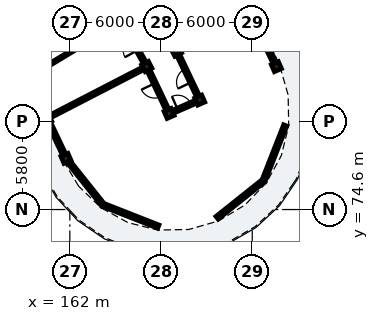
"""IFC4 building model, lengths in metres.
Left out: names, types, materials, properties, quantities, classifications, styles, units other than length and angle.
Written with IfcOpenShell. Run it as: python <this file> out.ifc"""

import sys

from ifc_helpers import new_model, si_unit, direction, frame, frame_2d, origin, origin_2d, place, context, subcontext, project, spatial, rectangle, extrude, element, fill, save


model = new_model("IFC4")
c1 = context("Model", 3, precision=1e-05, world=origin(), true_north=direction((0.0, 1.0)))
c2 = subcontext(c1, "Body", "Model", "MODEL_VIEW")
j1 = project(units=[si_unit("LENGTHUNIT", "METRE"), si_unit("PLANEANGLEUNIT", "RADIAN")], contexts=[c1])
p1 = place(None, origin())
s1 = spatial("IfcSite", under=j1, at=p1, CompositionType="ELEMENT")
p2 = place(p1, origin())
s2 = spatial("IfcBuilding", under=s1, at=p2, CompositionType="ELEMENT")
p3 = place(p2, frame((0.0, 0.0, 35.72)))
s3 = spatial("IfcBuildingStorey", under=s2, at=p3, CompositionType="ELEMENT", Elevation=35.72)
for number, where, z_axis, x_axis in (
    (1, (161.746, 77.964, 0.0), (0.0, 0.0, 1.0), (0.917, 0.4, 0.0)),
    (2, (168.53, 80.921, 0.0), (0.0, 0.0, 1.0), (0.917, 0.4, 0.0)),
    (3, (170.546, 81.801, 0.0), (0.0, 0.0, 1.0), (0.917, 0.4, 0.0)),
    (4, (175.588, 83.999, 0.0), (0.0, 0.0, 1.0), (0.917, 0.4, 0.0)),
    (5, (167.061, 84.008, 0.0), (0.0, 0.0, 1.0), (0.888, 0.459, 0.0)),
    (6, (169.015, 85.018, 0.0), (0.0, 0.0, 1.0), (0.888, 0.459, 0.0)),
):
    element("IfcColumn", number, at=place(p3, frame(where, z_axis=z_axis, x_axis=x_axis)), inside=s3, PredefinedType="COLUMN", context=c2, shape_type="SweptSolid", body=[
        extrude(rectangle(XDim=0.5, YDim=0.5, at=origin_2d()), origin(), (0.0, 0.0, 1.0), 3.115),
    ])
p4 = place(p3, frame((175.493, 84.197, 0.0), z_axis=(0.0, 0.0, 1.0), x_axis=(-0.429641817045, 0.902999395928, 0.0)))
e7 = element("IfcWall", 7, at=p4, inside=s3, PredefinedType="SOLIDWALL", context=c2, shape_type="SweptSolid", body=[
    extrude(rectangle(XDim=3.541, YDim=0.22, at=frame_2d((1.771, 0.0))), origin(), (0.0, 0.0, 1.0), 2.355),
])
p5 = place(p4, frame((1.17, 0.0, 0.55)))
e8 = element("IfcOpeningElement", 8, at=p5, cuts=e7, PredefinedType="OPENING", context=c2, shape_type="SweptSolid", body=[
    extrude(rectangle(XDim=1.2, YDim=1.51, at=frame_2d((0.6, 0.755))), frame((0.0, 0.12, 0.0), z_axis=(0.0, -1.0, 0.0), x_axis=(1.0, 0.0, 0.0)), (0.0, 0.0, 1.0), 0.24),
])
p6 = place(p3, frame((161.652, 78.163, 0.0), z_axis=(0.0, 0.0, 1.0), x_axis=(-0.429631962494, 0.903004084599, 0.0)))
e9 = element("IfcWall", 9, at=p6, inside=s3, PredefinedType="SOLIDWALL", context=c2, shape_type="SweptSolid", body=[
    extrude(rectangle(XDim=2.545, YDim=0.22, at=frame_2d((1.272, 0.0))), origin(), (0.0, 0.0, 1.0), 2.355),
])
p7 = place(p6, frame((0.533, 0.0, 0.55)))
e10 = element("IfcOpeningElement", 10, at=p7, cuts=e9, PredefinedType="OPENING", context=c2, shape_type="SweptSolid", body=[
    extrude(rectangle(XDim=1.48, YDim=1.46, at=frame_2d((0.74, 0.73))), frame((0.0, 0.12, 0.0), z_axis=(0.0, -1.0, 0.0), x_axis=(1.0, 0.0, 0.0)), (0.0, 0.0, 1.0), 0.24),
])
p8 = place(p3, frame((176.169, 80.134, 0.0), z_axis=(0.0, 0.0, 1.0), x_axis=(-0.365567330517, -0.930784898276, 0.0)))
e11 = element("IfcWall", 11, at=p8, inside=s3, PredefinedType="SOLIDWALL", context=c2, shape_type="SweptSolid", body=[
    extrude(rectangle(XDim=3.908, YDim=0.22, at=frame_2d((1.954, 0.0))), origin(), (0.0, 0.0, 1.0), 2.355),
])
p9 = place(p3, frame((174.74, 76.496, 0.0), z_axis=(0.0, 0.0, 1.0), x_axis=(-0.782007217765, -0.623269373034, 0.0)))
e12 = element("IfcWall", 12, at=p9, inside=s3, PredefinedType="SOLIDWALL", context=c2, shape_type="SweptSolid", body=[
    extrude(rectangle(XDim=3.908, YDim=0.22, at=frame_2d((1.954, 0.0))), origin(), (0.0, 0.0, 1.0), 2.355),
])
p10 = place(p9, frame((1.029, 0.0, 0.4)))
e13 = element("IfcOpeningElement", 13, at=p10, cuts=e12, PredefinedType="OPENING", context=c2, shape_type="SweptSolid", body=[
    extrude(rectangle(XDim=1.85, YDim=1.72, at=frame_2d((0.925, 0.86))), frame((0.0, 0.12, 0.0), z_axis=(0.0, -1.0, 0.0), x_axis=(1.0, 0.0, 0.0)), (0.0, 0.0, 1.0), 0.24),
])
p11 = place(p3, frame((167.82, 73.479, 0.0), z_axis=(0.0, 0.0, 1.0), x_axis=(-0.930784898276, 0.365567330517, 0.0)))
e14 = element("IfcWall", 14, at=p11, inside=s3, PredefinedType="SOLIDWALL", context=c2, shape_type="SweptSolid", body=[
    extrude(rectangle(XDim=3.908, YDim=0.22, at=frame_2d((1.954, 0.0))), origin(), (0.0, 0.0, 1.0), 2.355),
])
p12 = place(p3, frame((164.182, 74.908, 0.0), z_axis=(0.0, 0.0, 1.0), x_axis=(-0.623269373034, 0.782007217765, 0.0)))
e15 = element("IfcWall", 15, at=p12, inside=s3, PredefinedType="SOLIDWALL", context=c2, shape_type="SweptSolid", body=[
    extrude(rectangle(XDim=3.908, YDim=0.22, at=frame_2d((1.954, 0.0))), origin(), (0.0, 0.0, 1.0), 2.355),
])
p13 = place(p12, frame((1.029, 0.0, 0.4)))
e16 = element("IfcOpeningElement", 16, at=p13, cuts=e15, PredefinedType="OPENING", context=c2, shape_type="SweptSolid", body=[
    extrude(rectangle(XDim=1.85, YDim=1.72, at=frame_2d((0.925, 0.86))), frame((0.0, 0.12, 0.0), z_axis=(0.0, -1.0, 0.0), x_axis=(1.0, 0.0, 0.0)), (0.0, 0.0, 1.0), 0.24),
])
p14 = place(p3, frame((170.396, 82.116, 0.0), z_axis=(0.0, 0.0, 1.0), x_axis=(-0.429595933416, 0.90302122566, 0.0)))
e17 = element("IfcWall", 17, at=p14, inside=s3, PredefinedType="PARTITIONING", context=c2, shape_type="SweptSolid", body=[
    extrude(rectangle(XDim=2.863, YDim=0.205, at=frame_2d((1.432, 0.0))), origin(), (0.0, 0.0, 1.0), 2.37),
])
p15 = place(p14, frame((0.947, 0.0, 0.0)))
e18 = element("IfcOpeningElement", 18, at=p15, cuts=e17, PredefinedType="OPENING", context=c2, shape_type="SweptSolid", body=[
    extrude(rectangle(XDim=0.97, YDim=2.15, at=frame_2d((0.485, 1.075))), frame((0.0, 0.113, 0.0), z_axis=(0.0, -1.0, 0.0), x_axis=(1.0, 0.0, 0.0)), (0.0, 0.0, 1.0), 0.225),
])
p16 = place(p3, frame((168.379, 81.237, 0.0), z_axis=(0.0, 0.0, 1.0), x_axis=(-0.429630211913, 0.90300491749, 0.0)))
e19 = element("IfcWall", 19, at=p16, inside=s3, PredefinedType="PARTITIONING", context=c2, shape_type="SweptSolid", body=[
    extrude(rectangle(XDim=2.718, YDim=0.205, at=frame_2d((1.359, 0.0))), origin(), (0.0, 0.0, 1.0), 2.37),
])
p17 = place(p16, frame((0.874, 0.0, 0.0)))
e20 = element("IfcOpeningElement", 20, at=p17, cuts=e19, PredefinedType="OPENING", context=c2, shape_type="SweptSolid", body=[
    extrude(rectangle(XDim=0.97, YDim=2.15, at=frame_2d((0.485, 1.075))), frame((0.0, 0.113, 0.0), z_axis=(0.0, -1.0, 0.0), x_axis=(1.0, 0.0, 0.0)), (0.0, 0.0, 1.0), 0.225),
])
p18 = place(p3, frame((160.843, 80.794, 0.0), z_axis=(0.0, 0.0, 1.0), x_axis=(0.888346696024, 0.459173330741, 0.0)))
e21 = element("IfcWall", 21, at=p18, inside=s3, PredefinedType="PARTITIONING", context=c2, shape_type="SweptSolid", body=[
    extrude(rectangle(XDim=6.6, YDim=0.185, at=frame_2d((3.3, 0.0))), origin(), (0.0, 0.0, 1.0), 2.37),
])
p19 = place(p3, frame((166.89, 84.313, 0.0), z_axis=(0.0, 0.0, 1.0), x_axis=(-0.48819576874, 0.872734147025, 0.0)))
e22 = element("IfcWall", 22, at=p19, inside=s3, PredefinedType="PARTITIONING", context=c2, shape_type="SweptSolid", body=[
    extrude(rectangle(XDim=2.718, YDim=0.205, at=frame_2d((1.359, 0.0))), origin(), (0.0, 0.0, 1.0), 2.37),
])
p20 = place(p19, frame((0.884, 0.0, 0.0)))
e23 = element("IfcOpeningElement", 23, at=p20, cuts=e22, PredefinedType="OPENING", context=c2, shape_type="SweptSolid", body=[
    extrude(rectangle(XDim=0.95, YDim=2.13, at=frame_2d((0.475, 1.065))), frame((0.0, 0.113, 0.0), z_axis=(0.0, -1.0, 0.0), x_axis=(1.0, 0.0, 0.0)), (0.0, 0.0, 1.0), 0.225),
])
p21 = place(p3, frame((159.399, 83.374, 0.0), z_axis=(0.0, 0.0, 1.0), x_axis=(0.85616819337, 0.516697227263, 0.0)))
e24 = element("IfcWall", 24, at=p21, inside=s3, PredefinedType="PARTITIONING", context=c2, shape_type="SweptSolid", body=[
    extrude(rectangle(XDim=6.6, YDim=0.125, at=frame_2d((3.3, 0.0))), origin(), (0.0, 0.0, 1.0), 2.37),
])
p22 = place(p21, frame((2.865, 0.0, 0.0)))
e25 = element("IfcOpeningElement", 25, at=p22, cuts=e24, PredefinedType="OPENING", context=c2, shape_type="SweptSolid", body=[
    extrude(rectangle(XDim=0.87, YDim=2.08, at=frame_2d((0.435, 1.04))), frame((0.0, 0.073, 0.0), z_axis=(0.0, -1.0, 0.0), x_axis=(1.0, 0.0, 0.0)), (0.0, 0.0, 1.0), 0.145),
])
p23 = place(p3, frame((168.575, 80.941, 0.0), z_axis=(0.0, 0.0, 1.0), x_axis=(0.916636986934, 0.399720695216, 0.0)))
e26 = element("IfcWall", 26, at=p23, inside=s3, PredefinedType="PARTITIONING", context=c2, shape_type="SweptSolid", body=[
    extrude(rectangle(XDim=2.1, YDim=0.205, at=frame_2d((1.05, 0.0))), origin(), (0.0, 0.0, 1.0), 2.37),
])
p24 = place(p23, frame((0.57, 0.0, 0.0)))
e27 = element("IfcOpeningElement", 27, at=p24, cuts=e26, PredefinedType="OPENING", context=c2, shape_type="SweptSolid", body=[
    extrude(rectangle(XDim=0.95, YDim=2.13, at=frame_2d((0.475, 1.065))), frame((0.0, 0.113, 0.0), z_axis=(0.0, -1.0, 0.0), x_axis=(1.0, 0.0, 0.0)), (0.0, 0.0, 1.0), 0.225),
])
p25 = place(p7, origin())
e28 = element("IfcWindow", 28, at=p25, inside=s3, PartitioningType="SINGLE_PANEL", PredefinedType="WINDOW", context=c2, shape_type="SweptSolid", body=[
    extrude(rectangle(XDim=1.48, YDim=1.46, at=frame_2d((0.74, 0.73))), frame((0.0, 0.03, 0.0), z_axis=(0.0, -1.0, 0.0), x_axis=(1.0, 0.0, 0.0)), (0.0, 0.0, 1.0), 0.06),
])
fill(e10, e28)
p26 = place(p10, origin())
e29 = element("IfcWindow", 29, at=p26, inside=s3, PartitioningType="SINGLE_PANEL", PredefinedType="WINDOW", context=c2, shape_type="SweptSolid", body=[
    extrude(rectangle(XDim=1.85, YDim=1.72, at=frame_2d((0.925, 0.86))), frame((0.0, 0.03, 0.0), z_axis=(0.0, -1.0, 0.0), x_axis=(1.0, 0.0, 0.0)), (0.0, 0.0, 1.0), 0.06),
])
fill(e13, e29)
p27 = place(p13, origin())
e30 = element("IfcWindow", 30, at=p27, inside=s3, PartitioningType="SINGLE_PANEL", PredefinedType="WINDOW", context=c2, shape_type="SweptSolid", body=[
    extrude(rectangle(XDim=1.85, YDim=1.72, at=frame_2d((0.925, 0.86))), frame((0.0, 0.03, 0.0), z_axis=(0.0, -1.0, 0.0), x_axis=(1.0, 0.0, 0.0)), (0.0, 0.0, 1.0), 0.06),
])
fill(e16, e30)
p28 = place(p15, origin())
e31 = element("IfcDoor", 31, at=p28, inside=s3, OperationType="SINGLE_SWING_LEFT", PredefinedType="DOOR", context=c2, shape_type="SweptSolid", body=[
    extrude(rectangle(XDim=0.97, YDim=2.15, at=frame_2d((0.485, 1.075))), frame((0.0, 0.025, 0.0), z_axis=(0.0, -1.0, 0.0), x_axis=(1.0, 0.0, 0.0)), (0.0, 0.0, 1.0), 0.05),
])
fill(e18, e31)
p29 = place(p17, origin())
e32 = element("IfcDoor", 32, at=p29, inside=s3, OperationType="SINGLE_SWING_RIGHT", PredefinedType="DOOR", context=c2, shape_type="SweptSolid", body=[
    extrude(rectangle(XDim=0.97, YDim=2.15, at=frame_2d((0.485, 1.075))), frame((0.0, 0.025, 0.0), z_axis=(0.0, -1.0, 0.0), x_axis=(1.0, 0.0, 0.0)), (0.0, 0.0, 1.0), 0.05),
])
fill(e20, e32)
p30 = place(p22, origin())
e33 = element("IfcDoor", 33, at=p30, inside=s3, OperationType="SINGLE_SWING_LEFT", PredefinedType="DOOR", context=c2, shape_type="SweptSolid", body=[
    extrude(rectangle(XDim=0.87, YDim=2.08, at=frame_2d((0.435, 1.04))), frame((0.0, 0.025, 0.0), z_axis=(0.0, -1.0, 0.0), x_axis=(1.0, 0.0, 0.0)), (0.0, 0.0, 1.0), 0.05),
])
fill(e25, e33)
p31 = place(p24, origin())
e34 = element("IfcDoor", 34, at=p31, inside=s3, OperationType="SINGLE_SWING_LEFT", PredefinedType="DOOR", context=c2, shape_type="SweptSolid", body=[
    extrude(rectangle(XDim=0.95, YDim=2.13, at=frame_2d((0.475, 1.065))), frame((0.0, 0.025, 0.0), z_axis=(0.0, -1.0, 0.0), x_axis=(1.0, 0.0, 0.0)), (0.0, 0.0, 1.0), 0.05),
])
fill(e27, e34)
save(model, sys.argv[1])
